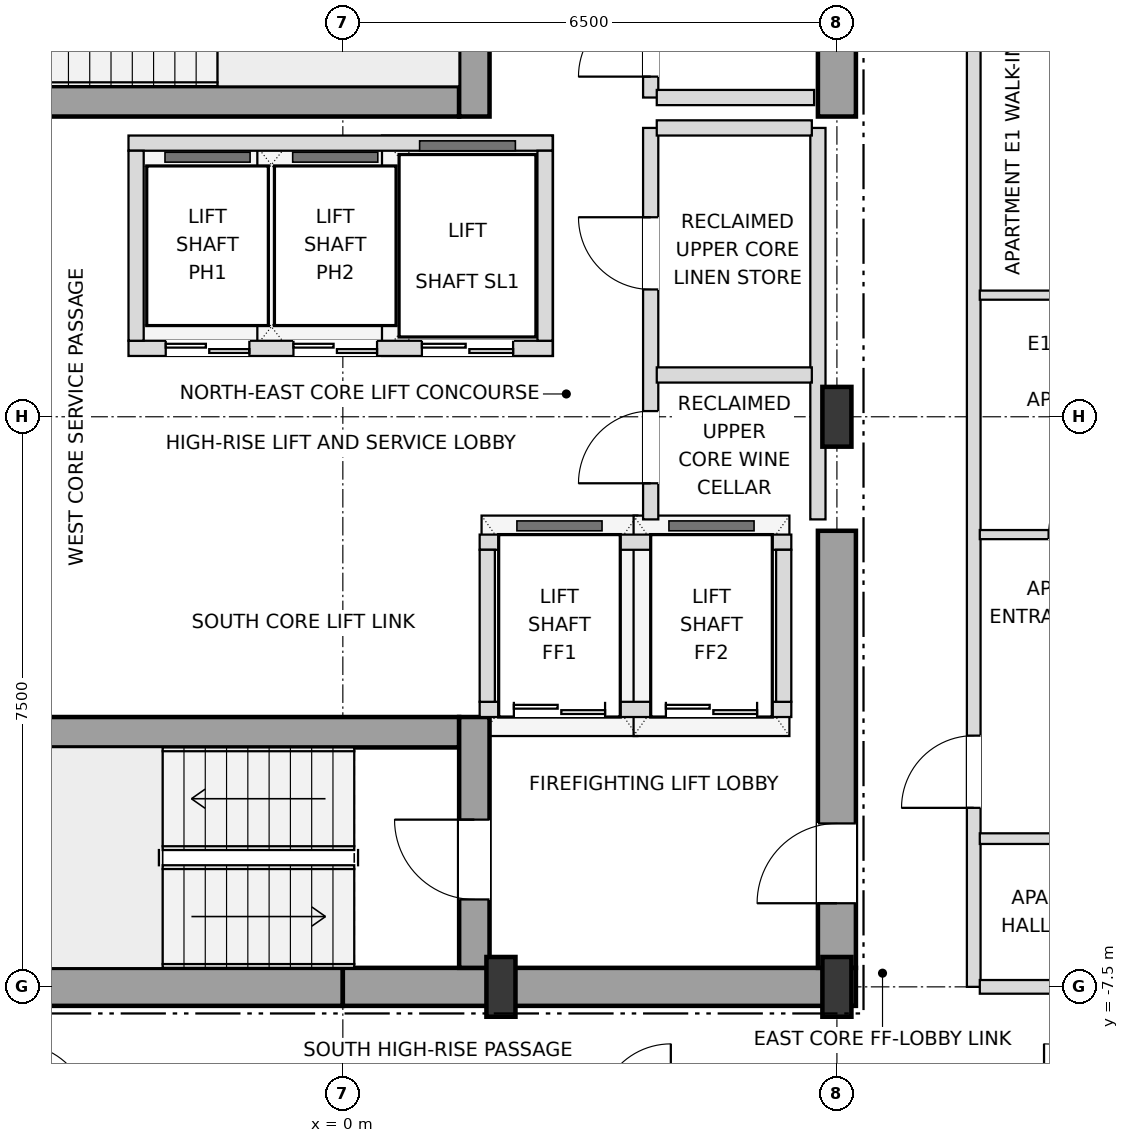
"""IFC4 building model, lengths in metres.
Left out: names, types, materials, properties, quantities, classifications, styles, units other than length and angle.
Written with IfcOpenShell. Run it as: python <this file> out.ifc"""

import sys

from ifc_helpers import new_model, si_unit, direction, frame, frame_2d, origin, origin_2d, place, context, subcontext, project, spatial, rectangle, i_section, extrude, element, fill, save


model = new_model("IFC4")
c1 = context("Model", 3, precision=1e-05, world=origin(), true_north=direction((0.0, 1.0)))
c2 = subcontext(c1, "Body", "Model", "MODEL_VIEW")
j1 = project(units=[si_unit("LENGTHUNIT", "METRE"), si_unit("PLANEANGLEUNIT", "RADIAN")], contexts=[c1])
p1 = place(None, origin())
s1 = spatial("IfcSite", under=j1, at=p1, CompositionType="ELEMENT")
p2 = place(p1, origin())
s2 = spatial("IfcBuilding", under=s1, at=p2, CompositionType="ELEMENT")
p3 = place(p2, frame((0.0, 0.0, 254.7)))
s3 = spatial("IfcBuildingStorey", under=s2, at=p3, CompositionType="ELEMENT", Elevation=254.7)
for number, where, z_axis, x_axis in (
    (1, (2.08, -7.5, 0.0), (0.0, 0.0, 1.0), (1.0, 0.0, 0.0)),
    (2, (6.5, -7.5, 0.0), (0.0, 0.0, 1.0), (1.0, 0.0, 0.0)),
    (3, (6.5, 0.0, 0.0), (0.0, 0.0, 1.0), (1.0, 0.0, 0.0)),
):
    element("IfcColumn", number, at=place(p3, frame(where, z_axis=z_axis, x_axis=x_axis)), inside=s3, PredefinedType="COLUMN", context=c2, shape_type="SweptSolid", body=[
        extrude(i_section(OverallWidth=0.382, OverallDepth=0.786, WebThickness=0.02, FlangeThickness=0.033, at=origin_2d()), origin(), (0.0, 0.0, 1.0), 3.6),
    ])
for number, where, z_axis, x_axis in (
    (4, (-6.75, -7.5, 0.0), (0.0, 0.0, 1.0), (1.0, 0.0, 0.0)),
    (5, (0.0, -7.5, 0.0), (0.0, 0.0, 1.0), (1.0, 0.0, 0.0)),
):
    element("IfcWall", number, at=place(p3, frame(where, z_axis=z_axis, x_axis=x_axis)), inside=s3, PredefinedType="SHEAR", context=c2, shape_type="SweptSolid", body=[
        extrude(rectangle(XDim=6.75, YDim=0.5, at=frame_2d((3.375, 0.0))), origin(), (0.0, 0.0, 1.0), 3.38),
    ])
p4 = place(p3, frame((6.5, -7.25, 0.0), z_axis=(0.0, 0.0, 1.0), x_axis=(0.0, 1.0, 0.0)))
e6 = element("IfcWall", 6, at=p4, inside=s3, PredefinedType="SHEAR", context=c2, shape_type="SweptSolid", body=[
    extrude(rectangle(XDim=5.75, YDim=0.5, at=frame_2d((2.875, 0.0))), origin(), (0.0, 0.0, 1.0), 3.38),
])
p5 = place(p4, frame((0.85, 0.0, 0.0)))
e7 = element("IfcOpeningElement", 7, at=p5, cuts=e6, PredefinedType="OPENING", context=c2, shape_type="SweptSolid", body=[
    extrude(rectangle(XDim=1.05, YDim=2.15, at=frame_2d((0.525, 1.075))), frame((0.0, 0.26, 0.0), z_axis=(0.0, -1.0, 0.0), x_axis=(1.0, 0.0, 0.0)), (0.0, 0.0, 1.0), 0.52),
])
p6 = place(p3, frame((6.5, 3.95, 0.0), z_axis=(0.0, 0.0, 1.0), x_axis=(0.0, 1.0, 0.0)))
e8 = element("IfcWall", 8, at=p6, inside=s3, PredefinedType="SHEAR", context=c2, shape_type="SweptSolid", body=[
    extrude(rectangle(XDim=3.3, YDim=0.5, at=frame_2d((1.65, 0.0))), origin(), (0.0, 0.0, 1.0), 3.38),
])
p7 = place(p3, frame((-6.25, -4.15, 0.0), z_axis=(0.0, 0.0, 1.0), x_axis=(1.0, 0.0, 0.0)))
e9 = element("IfcWall", 9, at=p7, inside=s3, PredefinedType="SHEAR", context=c2, shape_type="SweptSolid", body=[
    extrude(rectangle(XDim=7.78, YDim=0.4, at=frame_2d((3.89, 0.0))), origin(), (0.0, 0.0, 1.0), 3.38),
])
p8 = place(p3, frame((1.73, -7.25, 0.0), z_axis=(0.0, 0.0, 1.0), x_axis=(0.0, 1.0, 0.0)))
e10 = element("IfcWall", 10, at=p8, inside=s3, PredefinedType="SHEAR", context=c2, shape_type="SweptSolid", body=[
    extrude(rectangle(XDim=3.3, YDim=0.4, at=frame_2d((1.65, 0.0))), origin(), (0.0, 0.0, 1.0), 3.38),
])
p9 = place(p8, frame((0.9, 0.0, 0.0)))
e11 = element("IfcOpeningElement", 11, at=p9, cuts=e10, PredefinedType="OPENING", context=c2, shape_type="SweptSolid", body=[
    extrude(rectangle(XDim=1.05, YDim=2.15, at=frame_2d((0.525, 1.075))), frame((0.0, 0.21, 0.0), z_axis=(0.0, -1.0, 0.0), x_axis=(1.0, 0.0, 0.0)), (0.0, 0.0, 1.0), 0.42),
])
p10 = place(p3, frame((-5.55, 4.15, 0.0), z_axis=(0.0, 0.0, 1.0), x_axis=(1.0, 0.0, 0.0)))
e12 = element("IfcWall", 12, at=p10, inside=s3, PredefinedType="SHEAR", context=c2, shape_type="SweptSolid", body=[
    extrude(rectangle(XDim=7.08, YDim=0.4, at=frame_2d((3.54, 0.0))), origin(), (0.0, 0.0, 1.0), 3.38),
])
p11 = place(p3, frame((1.73, 3.95, 0.0), z_axis=(0.0, 0.0, 1.0), x_axis=(0.0, 1.0, 0.0)))
e13 = element("IfcWall", 13, at=p11, inside=s3, PredefinedType="SHEAR", context=c2, shape_type="SweptSolid", body=[
    extrude(rectangle(XDim=3.3, YDim=0.4, at=frame_2d((1.65, 0.0))), origin(), (0.0, 0.0, 1.0), 3.38),
])
p12 = place(p3, frame((-2.82, 0.9, 0.0), z_axis=(0.0, 0.0, 1.0), x_axis=(1.0, 0.0, 0.0)))
e14 = element("IfcWall", 14, at=p12, inside=s3, PredefinedType="SOLIDWALL", context=c2, shape_type="SweptSolid", body=[
    extrude(rectangle(XDim=5.58, YDim=0.2, at=frame_2d((2.79, 0.0))), origin(), (0.0, 0.0, 1.0), 3.38),
])
p13 = place(p12, frame((0.49, 0.0, 0.0)))
e15 = element("IfcOpeningElement", 15, at=p13, cuts=e14, PredefinedType="OPENING", context=c2, shape_type="SweptSolid", body=[
    extrude(rectangle(XDim=1.1, YDim=2.15, at=frame_2d((0.55, 1.075))), frame((0.0, 0.11, 0.0), z_axis=(0.0, -1.0, 0.0), x_axis=(1.0, 0.0, 0.0)), (0.0, 0.0, 1.0), 0.22),
])
p14 = place(p12, frame((2.17, 0.0, 0.0)))
e16 = element("IfcOpeningElement", 16, at=p14, cuts=e14, PredefinedType="OPENING", context=c2, shape_type="SweptSolid", body=[
    extrude(rectangle(XDim=1.1, YDim=2.15, at=frame_2d((0.55, 1.075))), frame((0.0, 0.11, 0.0), z_axis=(0.0, -1.0, 0.0), x_axis=(1.0, 0.0, 0.0)), (0.0, 0.0, 1.0), 0.22),
])
p15 = place(p12, frame((3.86, 0.0, 0.0)))
e17 = element("IfcOpeningElement", 17, at=p15, cuts=e14, PredefinedType="OPENING", context=c2, shape_type="SweptSolid", body=[
    extrude(rectangle(XDim=1.2, YDim=2.2, at=frame_2d((0.6, 1.1))), frame((0.0, 0.11, 0.0), z_axis=(0.0, -1.0, 0.0), x_axis=(1.0, 0.0, 0.0)), (0.0, 0.0, 1.0), 0.22),
])
p16 = place(p3, frame((-2.82, 3.6, 0.0), z_axis=(0.0, 0.0, 1.0), x_axis=(1.0, 0.0, 0.0)))
e18 = element("IfcWall", 18, at=p16, inside=s3, PredefinedType="SOLIDWALL", context=c2, shape_type="SweptSolid", body=[
    extrude(rectangle(XDim=5.58, YDim=0.2, at=frame_2d((2.79, 0.0))), origin(), (0.0, 0.0, 1.0), 3.38),
])
for number, where, z_axis, x_axis in (
    (19, (-2.72, 1.0, 0.0), (0.0, 0.0, 1.0), (0.0, 1.0, 0.0)),
    (20, (2.66, 1.0, 0.0), (0.0, 0.0, 1.0), (0.0, 1.0, 0.0)),
):
    element("IfcWall", number, at=place(p3, frame(where, z_axis=z_axis, x_axis=x_axis)), inside=s3, PredefinedType="SOLIDWALL", context=c2, shape_type="SweptSolid", body=[
        extrude(rectangle(XDim=2.5, YDim=0.2, at=frame_2d((1.25, 0.0))), origin(), (0.0, 0.0, 1.0), 3.38),
    ])
p17 = place(p3, frame((1.8, -3.85, 0.0), z_axis=(0.0, 0.0, 1.0), x_axis=(1.0, 0.0, 0.0)))
e21 = element("IfcWall", 21, at=p17, inside=s3, PredefinedType="SOLIDWALL", context=c2, shape_type="SweptSolid", body=[
    extrude(rectangle(XDim=4.1, YDim=0.2, at=frame_2d((2.05, 0.0))), origin(), (0.0, 0.0, 1.0), 3.38),
])
p18 = place(p17, frame((0.45, 0.0, 0.0)))
e22 = element("IfcOpeningElement", 22, at=p18, cuts=e21, PredefinedType="OPENING", context=c2, shape_type="SweptSolid", body=[
    extrude(rectangle(XDim=1.2, YDim=2.2, at=frame_2d((0.6, 1.1))), frame((0.0, 0.11, 0.0), z_axis=(0.0, -1.0, 0.0), x_axis=(1.0, 0.0, 0.0)), (0.0, 0.0, 1.0), 0.22),
])
p19 = place(p17, frame((2.45, 0.0, 0.0)))
e23 = element("IfcOpeningElement", 23, at=p19, cuts=e21, PredefinedType="OPENING", context=c2, shape_type="SweptSolid", body=[
    extrude(rectangle(XDim=1.2, YDim=2.2, at=frame_2d((0.6, 1.1))), frame((0.0, 0.11, 0.0), z_axis=(0.0, -1.0, 0.0), x_axis=(1.0, 0.0, 0.0)), (0.0, 0.0, 1.0), 0.22),
])
p20 = place(p3, frame((1.8, -1.65, 0.0), z_axis=(0.0, 0.0, 1.0), x_axis=(1.0, 0.0, 0.0)))
e24 = element("IfcWall", 24, at=p20, inside=s3, PredefinedType="SOLIDWALL", context=c2, shape_type="SweptSolid", body=[
    extrude(rectangle(XDim=4.1, YDim=0.2, at=frame_2d((2.05, 0.0))), origin(), (0.0, 0.0, 1.0), 3.38),
])
for number, where, z_axis, x_axis in (
    (25, (1.9, -3.75, 0.0), (0.0, 0.0, 1.0), (0.0, 1.0, 0.0)),
    (26, (5.8, -3.75, 0.0), (0.0, 0.0, 1.0), (0.0, 1.0, 0.0)),
):
    element("IfcWall", number, at=place(p3, frame(where, z_axis=z_axis, x_axis=x_axis)), inside=s3, PredefinedType="SOLIDWALL", context=c2, shape_type="SweptSolid", body=[
        extrude(rectangle(XDim=2.0, YDim=0.2, at=frame_2d((1.0, 0.0))), origin(), (0.0, 0.0, 1.0), 3.38),
    ])
p21 = place(p3, frame((4.05, -1.35, 0.0), z_axis=(0.0, 0.0, 1.0), x_axis=(0.0, 1.0, 0.0)))
e27 = element("IfcWall", 27, at=p21, inside=s3, PredefinedType="SOLIDWALL", context=c2, shape_type="SweptSolid", body=[
    extrude(rectangle(XDim=5.15, YDim=0.2, at=frame_2d((2.575, 0.0))), origin(), (0.0, 0.0, 1.0), 3.38),
])
p22 = place(p21, frame((0.475, 0.0, 0.0)))
e28 = element("IfcOpeningElement", 28, at=p22, cuts=e27, PredefinedType="OPENING", context=c2, shape_type="SweptSolid", body=[
    extrude(rectangle(XDim=0.95, YDim=2.15, at=frame_2d((0.475, 1.075))), frame((0.0, 0.11, 0.0), z_axis=(0.0, -1.0, 0.0), x_axis=(1.0, 0.0, 0.0)), (0.0, 0.0, 1.0), 0.22),
])
p23 = place(p21, frame((3.025, 0.0, 0.0)))
e29 = element("IfcOpeningElement", 29, at=p23, cuts=e27, PredefinedType="OPENING", context=c2, shape_type="SweptSolid", body=[
    extrude(rectangle(XDim=0.95, YDim=2.15, at=frame_2d((0.475, 1.075))), frame((0.0, 0.11, 0.0), z_axis=(0.0, -1.0, 0.0), x_axis=(1.0, 0.0, 0.0)), (0.0, 0.0, 1.0), 0.22),
])
p24 = place(p3, frame((4.05, 4.2, 0.0), z_axis=(0.0, 0.0, 1.0), x_axis=(0.0, 1.0, 0.0)))
e30 = element("IfcWall", 30, at=p24, inside=s3, PredefinedType="SOLIDWALL", context=c2, shape_type="SweptSolid", body=[
    extrude(rectangle(XDim=3.05, YDim=0.2, at=frame_2d((1.525, 0.0))), origin(), (0.0, 0.0, 1.0), 3.38),
])
p25 = place(p24, frame((0.275, 0.0, 0.0)))
e31 = element("IfcOpeningElement", 31, at=p25, cuts=e30, PredefinedType="OPENING", context=c2, shape_type="SweptSolid", body=[
    extrude(rectangle(XDim=0.95, YDim=2.15, at=frame_2d((0.475, 1.075))), frame((0.0, 0.11, 0.0), z_axis=(0.0, -1.0, 0.0), x_axis=(1.0, 0.0, 0.0)), (0.0, 0.0, 1.0), 0.22),
])
p26 = place(p24, frame((1.775, 0.0, 0.0)))
e32 = element("IfcOpeningElement", 32, at=p26, cuts=e30, PredefinedType="OPENING", context=c2, shape_type="SweptSolid", body=[
    extrude(rectangle(XDim=0.95, YDim=2.15, at=frame_2d((0.475, 1.075))), frame((0.0, 0.11, 0.0), z_axis=(0.0, -1.0, 0.0), x_axis=(1.0, 0.0, 0.0)), (0.0, 0.0, 1.0), 0.22),
])
p27 = place(p3, frame((6.25, -1.35, 0.0), z_axis=(0.0, 0.0, 1.0), x_axis=(0.0, 1.0, 0.0)))
e33 = element("IfcWall", 33, at=p27, inside=s3, PredefinedType="SOLIDWALL", context=c2, shape_type="SweptSolid", body=[
    extrude(rectangle(XDim=5.15, YDim=0.2, at=frame_2d((2.575, 0.0))), origin(), (0.0, 0.0, 1.0), 3.38),
])
p28 = place(p3, frame((8.3, -7.5, 0.0), z_axis=(0.0, 0.0, 1.0), x_axis=(0.0, 1.0, 0.0)))
e34 = element("IfcWall", 34, at=p28, inside=s3, PredefinedType="PARTITIONING", context=c2, shape_type="SweptSolid", body=[
    extrude(rectangle(XDim=15.0, YDim=0.18, at=frame_2d((7.5, 0.0))), origin(), (0.0, 0.0, 1.0), 3.38),
])
p29 = place(p28, frame((2.355, 0.0, 0.0)))
e35 = element("IfcOpeningElement", 35, at=p29, cuts=e34, PredefinedType="OPENING", context=c2, shape_type="SweptSolid", body=[
    extrude(rectangle(XDim=0.95, YDim=2.15, at=frame_2d((0.475, 1.075))), frame((0.0, 0.1, 0.0), z_axis=(0.0, -1.0, 0.0), x_axis=(1.0, 0.0, 0.0)), (0.0, 0.0, 1.0), 0.2),
])
p30 = place(p3, frame((8.38, -7.5, 0.0), z_axis=(0.0, 0.0, 1.0), x_axis=(1.0, 0.0, 0.0)))
e36 = element("IfcWall", 36, at=p30, inside=s3, PredefinedType="PARTITIONING", context=c2, shape_type="SweptSolid", body=[
    extrude(rectangle(XDim=2.74, YDim=0.18, at=frame_2d((1.37, 0.0))), origin(), (0.0, 0.0, 1.0), 2.826),
])
p31 = place(p3, frame((8.38, -5.55, 0.0), z_axis=(0.0, 0.0, 1.0), x_axis=(1.0, 0.0, 0.0)))
e37 = element("IfcWall", 37, at=p31, inside=s3, PredefinedType="PARTITIONING", context=c2, shape_type="SweptSolid", body=[
    extrude(rectangle(XDim=2.74, YDim=0.14, at=frame_2d((1.37, 0.0))), origin(), (0.0, 0.0, 1.0), 3.38),
])
p32 = place(p31, frame((0.93, 0.0, 0.0)))
e38 = element("IfcOpeningElement", 38, at=p32, cuts=e37, PredefinedType="OPENING", context=c2, shape_type="SweptSolid", body=[
    extrude(rectangle(XDim=0.9, YDim=2.1, at=frame_2d((0.45, 1.05))), frame((0.0, 0.08, 0.0), z_axis=(0.0, -1.0, 0.0), x_axis=(1.0, 0.0, 0.0)), (0.0, 0.0, 1.0), 0.16),
])
p33 = place(p3, frame((8.38, -1.55, 0.0), z_axis=(0.0, 0.0, 1.0), x_axis=(1.0, 0.0, 0.0)))
e39 = element("IfcWall", 39, at=p33, inside=s3, PredefinedType="PARTITIONING", context=c2, shape_type="SweptSolid", body=[
    extrude(rectangle(XDim=2.74, YDim=0.12, at=frame_2d((1.37, 0.0))), origin(), (0.0, 0.0, 1.0), 3.38),
])
p34 = place(p33, frame((0.905, 0.0, 0.0)))
e40 = element("IfcOpeningElement", 40, at=p34, cuts=e39, PredefinedType="OPENING", context=c2, shape_type="SweptSolid", body=[
    extrude(rectangle(XDim=0.95, YDim=2.1, at=frame_2d((0.475, 1.05))), frame((0.0, 0.07, 0.0), z_axis=(0.0, -1.0, 0.0), x_axis=(1.0, 0.0, 0.0)), (0.0, 0.0, 1.0), 0.14),
])
p35 = place(p3, frame((4.13, 0.55, 0.0), z_axis=(0.0, 0.0, 1.0), x_axis=(1.0, 0.0, 0.0)))
e41 = element("IfcWall", 41, at=p35, inside=s3, PredefinedType="SOLIDWALL", context=c2, shape_type="SweptSolid", body=[
    extrude(rectangle(XDim=2.04, YDim=0.2, at=frame_2d((1.02, 0.0))), origin(), (0.0, 0.0, 1.0), 3.38),
])
p36 = place(p3, frame((8.38, 1.6, 0.0), z_axis=(0.0, 0.0, 1.0), x_axis=(1.0, 0.0, 0.0)))
e42 = element("IfcWall", 42, at=p36, inside=s3, PredefinedType="PARTITIONING", context=c2, shape_type="SweptSolid", body=[
    extrude(rectangle(XDim=2.74, YDim=0.12, at=frame_2d((1.37, 0.0))), origin(), (0.0, 0.0, 1.0), 3.38),
])
p37 = place(p36, frame((0.93, 0.0, 0.0)))
e43 = element("IfcOpeningElement", 43, at=p37, cuts=e42, PredefinedType="OPENING", context=c2, shape_type="SweptSolid", body=[
    extrude(rectangle(XDim=0.9, YDim=2.1, at=frame_2d((0.45, 1.05))), frame((0.0, 0.07, 0.0), z_axis=(0.0, -1.0, 0.0), x_axis=(1.0, 0.0, 0.0)), (0.0, 0.0, 1.0), 0.14),
])
p38 = place(p3, frame((4.13, 3.8, 0.0), z_axis=(0.0, 0.0, 1.0), x_axis=(1.0, 0.0, 0.0)))
e44 = element("IfcWall", 44, at=p38, inside=s3, PredefinedType="SOLIDWALL", context=c2, shape_type="SweptSolid", body=[
    extrude(rectangle(XDim=2.04, YDim=0.2, at=frame_2d((1.02, 0.0))), origin(), (0.0, 0.0, 1.0), 3.38),
])
p39 = place(p3, frame((4.13, 4.2, 0.0), z_axis=(0.0, 0.0, 1.0), x_axis=(1.0, 0.0, 0.0)))
e45 = element("IfcWall", 45, at=p39, inside=s3, PredefinedType="SOLIDWALL", context=c2, shape_type="SweptSolid", body=[
    extrude(rectangle(XDim=2.07, YDim=0.2, at=frame_2d((1.035, 0.0))), origin(), (0.0, 0.0, 1.0), 3.38),
])
p40 = place(p5, origin())
e46 = element("IfcDoor", 46, at=p40, inside=s3, OperationType="SINGLE_SWING_LEFT", PredefinedType="DOOR", context=c2, shape_type="SweptSolid", body=[
    extrude(rectangle(XDim=1.05, YDim=2.15, at=frame_2d((0.525, 1.075))), frame((0.0, 0.025, 0.0), z_axis=(0.0, -1.0, 0.0), x_axis=(1.0, 0.0, 0.0)), (0.0, 0.0, 1.0), 0.05),
])
fill(e7, e46)
p41 = place(p9, origin())
e47 = element("IfcDoor", 47, at=p41, inside=s3, OperationType="SINGLE_SWING_RIGHT", PredefinedType="DOOR", context=c2, shape_type="SweptSolid", body=[
    extrude(rectangle(XDim=1.05, YDim=2.15, at=frame_2d((0.525, 1.075))), frame((0.0, 0.025, 0.0), z_axis=(0.0, -1.0, 0.0), x_axis=(1.0, 0.0, 0.0)), (0.0, 0.0, 1.0), 0.05),
])
fill(e11, e47)
p42 = place(p13, origin())
e48 = element("IfcDoor", 48, at=p42, inside=s3, OperationType="DOUBLE_DOOR_SLIDING", PredefinedType="DOOR", context=c2, shape_type="SweptSolid", body=[
    extrude(rectangle(XDim=1.1, YDim=2.15, at=frame_2d((0.55, 1.075))), frame((0.0, 0.025, 0.0), z_axis=(0.0, -1.0, 0.0), x_axis=(1.0, 0.0, 0.0)), (0.0, 0.0, 1.0), 0.05),
])
fill(e15, e48)
p43 = place(p14, origin())
e49 = element("IfcDoor", 49, at=p43, inside=s3, OperationType="DOUBLE_DOOR_SLIDING", PredefinedType="DOOR", context=c2, shape_type="SweptSolid", body=[
    extrude(rectangle(XDim=1.1, YDim=2.15, at=frame_2d((0.55, 1.075))), frame((0.0, 0.025, 0.0), z_axis=(0.0, -1.0, 0.0), x_axis=(1.0, 0.0, 0.0)), (0.0, 0.0, 1.0), 0.05),
])
fill(e16, e49)
p44 = place(p15, origin())
e50 = element("IfcDoor", 50, at=p44, inside=s3, OperationType="DOUBLE_DOOR_SLIDING", PredefinedType="DOOR", context=c2, shape_type="SweptSolid", body=[
    extrude(rectangle(XDim=1.2, YDim=2.2, at=frame_2d((0.6, 1.1))), frame((0.0, 0.025, 0.0), z_axis=(0.0, -1.0, 0.0), x_axis=(1.0, 0.0, 0.0)), (0.0, 0.0, 1.0), 0.05),
])
fill(e17, e50)
p45 = place(p18, origin())
e51 = element("IfcDoor", 51, at=p45, inside=s3, OperationType="DOUBLE_DOOR_SLIDING", PredefinedType="DOOR", context=c2, shape_type="SweptSolid", body=[
    extrude(rectangle(XDim=1.2, YDim=2.2, at=frame_2d((0.6, 1.1))), frame((0.0, 0.025, 0.0), z_axis=(0.0, -1.0, 0.0), x_axis=(1.0, 0.0, 0.0)), (0.0, 0.0, 1.0), 0.05),
])
fill(e22, e51)
p46 = place(p19, origin())
e52 = element("IfcDoor", 52, at=p46, inside=s3, OperationType="DOUBLE_DOOR_SLIDING", PredefinedType="DOOR", context=c2, shape_type="SweptSolid", body=[
    extrude(rectangle(XDim=1.2, YDim=2.2, at=frame_2d((0.6, 1.1))), frame((0.0, 0.025, 0.0), z_axis=(0.0, -1.0, 0.0), x_axis=(1.0, 0.0, 0.0)), (0.0, 0.0, 1.0), 0.05),
])
fill(e23, e52)
p47 = place(p22, origin())
e53 = element("IfcDoor", 53, at=p47, inside=s3, OperationType="SINGLE_SWING_LEFT", PredefinedType="DOOR", context=c2, shape_type="SweptSolid", body=[
    extrude(rectangle(XDim=0.95, YDim=2.15, at=frame_2d((0.475, 1.075))), frame((0.0, 0.025, 0.0), z_axis=(0.0, -1.0, 0.0), x_axis=(1.0, 0.0, 0.0)), (0.0, 0.0, 1.0), 0.05),
])
fill(e28, e53)
p48 = place(p23, origin())
e54 = element("IfcDoor", 54, at=p48, inside=s3, OperationType="SINGLE_SWING_RIGHT", PredefinedType="DOOR", context=c2, shape_type="SweptSolid", body=[
    extrude(rectangle(XDim=0.95, YDim=2.15, at=frame_2d((0.475, 1.075))), frame((0.0, 0.025, 0.0), z_axis=(0.0, -1.0, 0.0), x_axis=(1.0, 0.0, 0.0)), (0.0, 0.0, 1.0), 0.05),
])
fill(e29, e54)
p49 = place(p25, origin())
e55 = element("IfcDoor", 55, at=p49, inside=s3, OperationType="SINGLE_SWING_LEFT", PredefinedType="DOOR", context=c2, shape_type="SweptSolid", body=[
    extrude(rectangle(XDim=0.95, YDim=2.15, at=frame_2d((0.475, 1.075))), frame((0.0, 0.025, 0.0), z_axis=(0.0, -1.0, 0.0), x_axis=(1.0, 0.0, 0.0)), (0.0, 0.0, 1.0), 0.05),
])
fill(e31, e55)
p50 = place(p29, origin())
e56 = element("IfcDoor", 56, at=p50, inside=s3, OperationType="SINGLE_SWING_LEFT", PredefinedType="DOOR", context=c2, shape_type="SweptSolid", body=[
    extrude(rectangle(XDim=0.95, YDim=2.15, at=frame_2d((0.475, 1.075))), frame((0.0, 0.025, 0.0), z_axis=(0.0, -1.0, 0.0), x_axis=(1.0, 0.0, 0.0)), (0.0, 0.0, 1.0), 0.05),
])
fill(e35, e56)
p51 = place(p34, origin())
e57 = element("IfcDoor", 57, at=p51, inside=s3, OperationType="SINGLE_SWING_RIGHT", PredefinedType="DOOR", context=c2, shape_type="SweptSolid", body=[
    extrude(rectangle(XDim=0.95, YDim=2.1, at=frame_2d((0.475, 1.05))), frame((0.0, 0.025, 0.0), z_axis=(0.0, -1.0, 0.0), x_axis=(1.0, 0.0, 0.0)), (0.0, 0.0, 1.0), 0.05),
])
fill(e40, e57)
save(model, sys.argv[1])
